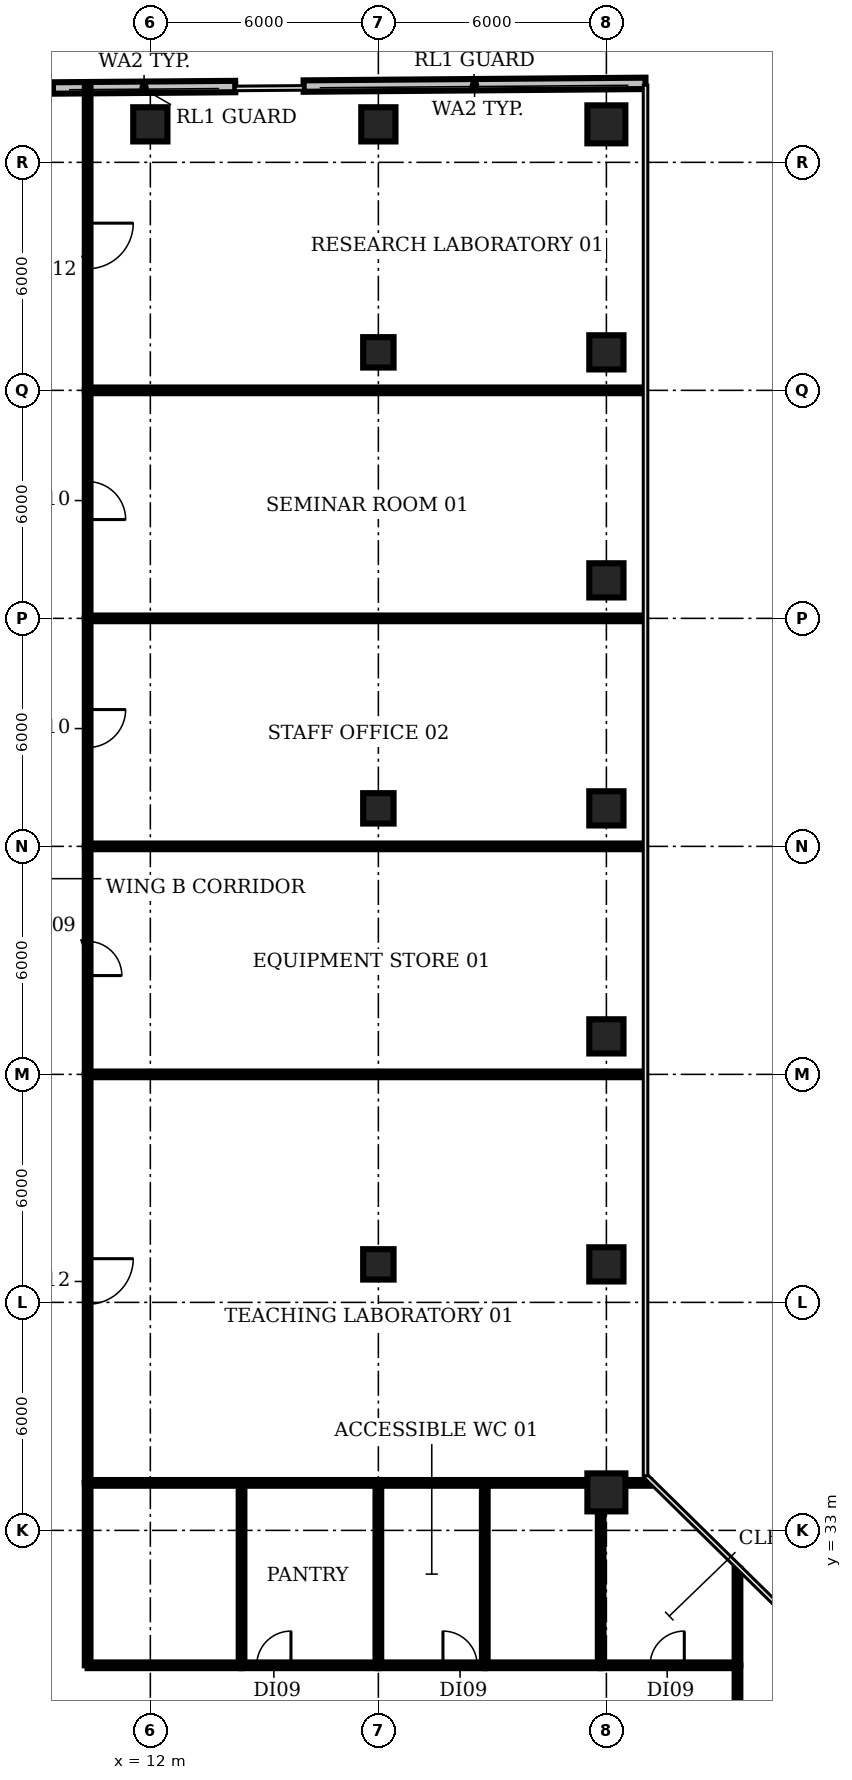
"""IFC4 building model, lengths in metres.
Left out: names, types, materials, properties, quantities, classifications, styles, units other than length and angle.
Written with IfcOpenShell. Run it as: python <this file> out.ifc"""

import sys

from ifc_helpers import new_model, si_unit, direction, frame, frame_2d, origin, origin_2d, place, context, subcontext, project, spatial, rectangle, circle, extrude, element, fill, save


model = new_model("IFC4")
c1 = context("Model", 3, precision=1e-05, world=origin(), true_north=direction((0.0, 1.0)))
c2 = subcontext(c1, "Body", "Model", "MODEL_VIEW")
j1 = project(units=[si_unit("LENGTHUNIT", "METRE"), si_unit("PLANEANGLEUNIT", "RADIAN")], contexts=[c1])
p1 = place(None, origin())
s1 = spatial("IfcSite", under=j1, at=p1, CompositionType="ELEMENT")
p2 = place(p1, origin())
s2 = spatial("IfcBuilding", under=s1, at=p2, CompositionType="ELEMENT")
p3 = place(p2, frame((0.0, 0.0, 108.8)))
s3 = spatial("IfcBuildingStorey", under=s2, at=p3, CompositionType="ELEMENT", Elevation=108.8)
p4 = place(p3, frame((12.0, 70.0, 0.0), z_axis=(0.0, 0.0, 1.0), x_axis=(1.0, 0.0, 0.0)))
e1 = element("IfcColumn", 1, at=p4, inside=s3, PredefinedType="COLUMN", context=c2, shape_type="SweptSolid", body=[
    extrude(rectangle(XDim=0.9, YDim=0.9, at=origin_2d()), origin(), (0.0, 0.0, 1.0), 3.85),
])
for number, where, z_axis, x_axis in (
    (2, (18.0, 40.0, 0.0), (0.0, 0.0, 1.0), (1.0, 0.0, 0.0)),
    (3, (18.0, 52.0, 0.0), (0.0, 0.0, 1.0), (1.0, 0.0, 0.0)),
    (4, (18.0, 64.0, 0.0), (0.0, 0.0, 1.0), (1.0, 0.0, 0.0)),
):
    element("IfcColumn", number, at=place(p3, frame(where, z_axis=z_axis, x_axis=x_axis)), inside=s3, PredefinedType="COLUMN", context=c2, shape_type="SweptSolid", body=[
        extrude(rectangle(XDim=0.8, YDim=0.8, at=origin_2d()), origin(), (0.0, 0.0, 1.0), 3.85),
    ])
p5 = place(p3, frame((18.0, 70.0, 0.0), z_axis=(0.0, 0.0, 1.0), x_axis=(1.0, 0.0, 0.0)))
e5 = element("IfcColumn", 5, at=p5, inside=s3, PredefinedType="COLUMN", context=c2, shape_type="SweptSolid", body=[
    extrude(rectangle(XDim=0.9, YDim=0.9, at=origin_2d()), origin(), (0.0, 0.0, 1.0), 3.85),
])
p6 = place(p3, frame((24.0, 34.0, 0.0), z_axis=(0.0, 0.0, 1.0), x_axis=(1.0, 0.0, 0.0)))
e6 = element("IfcColumn", 6, at=p6, inside=s3, PredefinedType="COLUMN", context=c2, shape_type="SweptSolid", body=[
    extrude(circle(Radius=0.5, at=origin_2d()), origin(), (0.0, 0.0, 1.0), 3.85),
])
for number, where, z_axis, x_axis in (
    (7, (24.0, 40.0, 0.0), (0.0, 0.0, 1.0), (1.0, 0.0, 0.0)),
    (8, (24.0, 46.0, 0.0), (0.0, 0.0, 1.0), (1.0, 0.0, 0.0)),
    (9, (24.0, 52.0, 0.0), (0.0, 0.0, 1.0), (1.0, 0.0, 0.0)),
    (10, (24.0, 58.0, 0.0), (0.0, 0.0, 1.0), (1.0, 0.0, 0.0)),
    (11, (24.0, 64.0, 0.0), (0.0, 0.0, 1.0), (1.0, 0.0, 0.0)),
):
    element("IfcColumn", number, at=place(p3, frame(where, z_axis=z_axis, x_axis=x_axis)), inside=s3, PredefinedType="COLUMN", context=c2, shape_type="SweptSolid", body=[
        extrude(rectangle(XDim=0.9, YDim=0.9, at=origin_2d()), origin(), (0.0, 0.0, 1.0), 3.85),
    ])
p7 = place(p3, frame((24.0, 70.0, 0.0), z_axis=(0.0, 0.0, 1.0), x_axis=(1.0, 0.0, 0.0)))
e12 = element("IfcColumn", 12, at=p7, inside=s3, PredefinedType="COLUMN", context=c2, shape_type="SweptSolid", body=[
    extrude(circle(Radius=0.5, at=origin_2d()), origin(), (0.0, 0.0, 1.0), 3.85),
])
p8 = place(p3, frame((25.03, 71.078, 0.0), z_axis=(0.0, 0.0, 1.0), x_axis=(-0.999968601349, -0.007924412614, 0.0)))
e13 = element("IfcWall", 13, at=p8, inside=s3, PredefinedType="SOLIDWALL", context=c2, shape_type="SweptSolid", body=[
    extrude(rectangle(XDim=8.996, YDim=0.3, at=frame_2d((4.498, 0.0))), origin(), (0.0, 0.0, 1.0), 3.85),
])
p9 = place(p3, frame((14.234, 70.995, 0.0), z_axis=(0.0, 0.0, 1.0), x_axis=(-0.999968890859, -0.007887795322, 0.0)))
e14 = element("IfcWall", 14, at=p9, inside=s3, PredefinedType="SOLIDWALL", context=c2, shape_type="SweptSolid", body=[
    extrude(rectangle(XDim=4.798, YDim=0.3, at=frame_2d((2.399, 0.0))), origin(), (0.0, 0.0, 1.0), 3.85),
])
p10 = place(p3, frame((10.35, 29.45, 0.0), z_axis=(0.0, 0.0, 1.0), x_axis=(0.0, 1.0, 0.0)))
e15 = element("IfcWall", 15, at=p10, inside=s3, PredefinedType="PARTITIONING", context=c2, shape_type="SweptSolid", body=[
    extrude(rectangle(XDim=4.8, YDim=0.15, at=frame_2d((2.4, 0.0))), origin(), (0.0, 0.0, 1.0), 2.83),
])
p11 = place(p3, frame((10.35, 29.45, 0.0), z_axis=(0.0, 0.0, 1.0), x_axis=(1.0, 0.0, 0.0)))
e16 = element("IfcWall", 16, at=p11, inside=s3, PredefinedType="PARTITIONING", context=c2, shape_type="SweptSolid", body=[
    extrude(rectangle(XDim=4.05, YDim=0.15, at=frame_2d((2.025, 0.0))), origin(), (0.0, 0.0, 1.0), 2.83),
])
p12 = place(p3, frame((10.35, 34.25, 0.0), z_axis=(0.0, 0.0, 1.0), x_axis=(1.0, 0.0, 0.0)))
e17 = element("IfcWall", 17, at=p12, inside=s3, PredefinedType="PARTITIONING", context=c2, shape_type="SweptSolid", body=[
    extrude(rectangle(XDim=14.8, YDim=0.15, at=frame_2d((7.4, 0.0))), origin(), (0.0, 0.0, 1.0), 2.83),
])
p13 = place(p3, frame((10.35, 45.0, 0.0), z_axis=(0.0, 0.0, 1.0), x_axis=(0.0, -1.0, 0.0)))
e18 = element("IfcWall", 18, at=p13, inside=s3, PredefinedType="PARTITIONING", context=c2, shape_type="SweptSolid", body=[
    extrude(rectangle(XDim=10.75, YDim=0.15, at=frame_2d((5.375, 0.0))), origin(), (0.0, 0.0, 1.0), 2.83),
])
p14 = place(p13, frame((4.85, 0.0, 0.0)))
e19 = element("IfcOpeningElement", 19, at=p14, cuts=e18, PredefinedType="OPENING", context=c2, shape_type="SweptSolid", body=[
    extrude(rectangle(XDim=1.2, YDim=2.1, at=frame_2d((0.6, 1.05))), frame((0.0, 0.085, 0.0), z_axis=(0.0, -1.0, 0.0), x_axis=(1.0, 0.0, 0.0)), (0.0, 0.0, 1.0), 0.17),
])
p15 = place(p3, frame((10.35, 45.0, 0.0), z_axis=(0.0, 0.0, 1.0), x_axis=(1.0, 0.0, 0.0)))
e20 = element("IfcWall", 20, at=p15, inside=s3, PredefinedType="PARTITIONING", context=c2, shape_type="SweptSolid", body=[
    extrude(rectangle(XDim=14.63, YDim=0.15, at=frame_2d((7.315, 0.0))), origin(), (0.0, 0.0, 1.0), 2.83),
])
p16 = place(p3, frame((10.35, 51.0, 0.0), z_axis=(0.0, 0.0, 1.0), x_axis=(0.0, -1.0, 0.0)))
e21 = element("IfcWall", 21, at=p16, inside=s3, PredefinedType="PARTITIONING", context=c2, shape_type="SweptSolid", body=[
    extrude(rectangle(XDim=6.0, YDim=0.15, at=frame_2d((3.0, 0.0))), origin(), (0.0, 0.0, 1.0), 2.83),
])
p17 = place(p16, frame((2.5, 0.0, 0.0)))
e22 = element("IfcOpeningElement", 22, at=p17, cuts=e21, PredefinedType="OPENING", context=c2, shape_type="SweptSolid", body=[
    extrude(rectangle(XDim=0.9, YDim=2.1, at=frame_2d((0.45, 1.05))), frame((0.0, 0.085, 0.0), z_axis=(0.0, -1.0, 0.0), x_axis=(1.0, 0.0, 0.0)), (0.0, 0.0, 1.0), 0.17),
])
p18 = place(p3, frame((10.35, 51.0, 0.0), z_axis=(0.0, 0.0, 1.0), x_axis=(1.0, 0.0, 0.0)))
e23 = element("IfcWall", 23, at=p18, inside=s3, PredefinedType="PARTITIONING", context=c2, shape_type="SweptSolid", body=[
    extrude(rectangle(XDim=14.63, YDim=0.15, at=frame_2d((7.315, 0.0))), origin(), (0.0, 0.0, 1.0), 2.83),
])
p19 = place(p3, frame((10.35, 57.0, 0.0), z_axis=(0.0, 0.0, 1.0), x_axis=(0.0, -1.0, 0.0)))
e24 = element("IfcWall", 24, at=p19, inside=s3, PredefinedType="PARTITIONING", context=c2, shape_type="SweptSolid", body=[
    extrude(rectangle(XDim=6.0, YDim=0.15, at=frame_2d((3.0, 0.0))), origin(), (0.0, 0.0, 1.0), 2.83),
])
p20 = place(p19, frame((2.4, 0.0, 0.0)))
e25 = element("IfcOpeningElement", 25, at=p20, cuts=e24, PredefinedType="OPENING", context=c2, shape_type="SweptSolid", body=[
    extrude(rectangle(XDim=1.0, YDim=2.1, at=frame_2d((0.5, 1.05))), frame((0.0, 0.085, 0.0), z_axis=(0.0, -1.0, 0.0), x_axis=(1.0, 0.0, 0.0)), (0.0, 0.0, 1.0), 0.17),
])
p21 = place(p3, frame((10.35, 57.0, 0.0), z_axis=(0.0, 0.0, 1.0), x_axis=(1.0, 0.0, 0.0)))
e26 = element("IfcWall", 26, at=p21, inside=s3, PredefinedType="PARTITIONING", context=c2, shape_type="SweptSolid", body=[
    extrude(rectangle(XDim=14.63, YDim=0.15, at=frame_2d((7.315, 0.0))), origin(), (0.0, 0.0, 1.0), 2.83),
])
p22 = place(p3, frame((10.35, 63.0, 0.0), z_axis=(0.0, 0.0, 1.0), x_axis=(0.0, -1.0, 0.0)))
e27 = element("IfcWall", 27, at=p22, inside=s3, PredefinedType="PARTITIONING", context=c2, shape_type="SweptSolid", body=[
    extrude(rectangle(XDim=6.0, YDim=0.15, at=frame_2d((3.0, 0.0))), origin(), (0.0, 0.0, 1.0), 2.83),
])
p23 = place(p22, frame((2.4, 0.0, 0.0)))
e28 = element("IfcOpeningElement", 28, at=p23, cuts=e27, PredefinedType="OPENING", context=c2, shape_type="SweptSolid", body=[
    extrude(rectangle(XDim=1.0, YDim=2.1, at=frame_2d((0.5, 1.05))), frame((0.0, 0.085, 0.0), z_axis=(0.0, -1.0, 0.0), x_axis=(1.0, 0.0, 0.0)), (0.0, 0.0, 1.0), 0.17),
])
p24 = place(p3, frame((10.35, 63.0, 0.0), z_axis=(0.0, 0.0, 1.0), x_axis=(1.0, 0.0, 0.0)))
e29 = element("IfcWall", 29, at=p24, inside=s3, PredefinedType="PARTITIONING", context=c2, shape_type="SweptSolid", body=[
    extrude(rectangle(XDim=14.63, YDim=0.15, at=frame_2d((7.315, 0.0))), origin(), (0.0, 0.0, 1.0), 2.83),
])
p25 = place(p3, frame((10.35, 70.974, 0.0), z_axis=(0.0, 0.0, 1.0), x_axis=(0.0, -1.0, 0.0)))
e30 = element("IfcWall", 30, at=p25, inside=s3, PredefinedType="PARTITIONING", context=c2, shape_type="SweptSolid", body=[
    extrude(rectangle(XDim=7.974, YDim=0.15, at=frame_2d((3.987, 0.0))), origin(), (0.0, 0.0, 1.0), 2.83),
])
p26 = place(p25, frame((3.574, 0.0, 0.0)))
e31 = element("IfcOpeningElement", 31, at=p26, cuts=e30, PredefinedType="OPENING", context=c2, shape_type="SweptSolid", body=[
    extrude(rectangle(XDim=1.2, YDim=2.1, at=frame_2d((0.6, 1.05))), frame((0.0, 0.085, 0.0), z_axis=(0.0, -1.0, 0.0), x_axis=(1.0, 0.0, 0.0)), (0.0, 0.0, 1.0), 0.17),
])
p27 = place(p3, frame((14.4, 29.45, 0.0), z_axis=(0.0, 0.0, 1.0), x_axis=(0.0, 1.0, 0.0)))
e32 = element("IfcWall", 32, at=p27, inside=s3, PredefinedType="PARTITIONING", context=c2, shape_type="SweptSolid", body=[
    extrude(rectangle(XDim=4.8, YDim=0.15, at=frame_2d((2.4, 0.0))), origin(), (0.0, 0.0, 1.0), 2.83),
])
p28 = place(p3, frame((14.4, 29.45, 0.0), z_axis=(0.0, 0.0, 1.0), x_axis=(1.0, 0.0, 0.0)))
e33 = element("IfcWall", 33, at=p28, inside=s3, PredefinedType="PARTITIONING", context=c2, shape_type="SweptSolid", body=[
    extrude(rectangle(XDim=3.6, YDim=0.15, at=frame_2d((1.8, 0.0))), origin(), (0.0, 0.0, 1.0), 2.83),
])
p29 = place(p28, frame((0.4, 0.0, 0.0)))
e34 = element("IfcOpeningElement", 34, at=p29, cuts=e33, PredefinedType="OPENING", context=c2, shape_type="SweptSolid", body=[
    extrude(rectangle(XDim=0.9, YDim=2.1, at=frame_2d((0.45, 1.05))), frame((0.0, 0.085, 0.0), z_axis=(0.0, -1.0, 0.0), x_axis=(1.0, 0.0, 0.0)), (0.0, 0.0, 1.0), 0.17),
])
p30 = place(p3, frame((18.0, 29.45, 0.0), z_axis=(0.0, 0.0, 1.0), x_axis=(0.0, 1.0, 0.0)))
e35 = element("IfcWall", 35, at=p30, inside=s3, PredefinedType="PARTITIONING", context=c2, shape_type="SweptSolid", body=[
    extrude(rectangle(XDim=4.8, YDim=0.15, at=frame_2d((2.4, 0.0))), origin(), (0.0, 0.0, 1.0), 2.83),
])
p31 = place(p3, frame((18.0, 29.45, 0.0), z_axis=(0.0, 0.0, 1.0), x_axis=(1.0, 0.0, 0.0)))
e36 = element("IfcWall", 36, at=p31, inside=s3, PredefinedType="PARTITIONING", context=c2, shape_type="SweptSolid", body=[
    extrude(rectangle(XDim=2.8, YDim=0.15, at=frame_2d((1.4, 0.0))), origin(), (0.0, 0.0, 1.0), 2.83),
])
p32 = place(p31, frame((1.7, 0.0, 0.0)))
e37 = element("IfcOpeningElement", 37, at=p32, cuts=e36, PredefinedType="OPENING", context=c2, shape_type="SweptSolid", body=[
    extrude(rectangle(XDim=0.9, YDim=2.1, at=frame_2d((0.45, 1.05))), frame((0.0, 0.085, 0.0), z_axis=(0.0, -1.0, 0.0), x_axis=(1.0, 0.0, 0.0)), (0.0, 0.0, 1.0), 0.17),
])
p33 = place(p3, frame((20.8, 29.45, 0.0), z_axis=(0.0, 0.0, 1.0), x_axis=(0.0, 1.0, 0.0)))
e38 = element("IfcWall", 38, at=p33, inside=s3, PredefinedType="PARTITIONING", context=c2, shape_type="SweptSolid", body=[
    extrude(rectangle(XDim=4.8, YDim=0.15, at=frame_2d((2.4, 0.0))), origin(), (0.0, 0.0, 1.0), 2.83),
])
p34 = place(p3, frame((20.8, 29.45, 0.0), z_axis=(0.0, 0.0, 1.0), x_axis=(1.0, 0.0, 0.0)))
e39 = element("IfcWall", 39, at=p34, inside=s3, PredefinedType="PARTITIONING", context=c2, shape_type="SweptSolid", body=[
    extrude(rectangle(XDim=3.05, YDim=0.15, at=frame_2d((1.525, 0.0))), origin(), (0.0, 0.0, 1.0), 2.83),
])
p35 = place(p3, frame((23.85, 29.45, 0.0), z_axis=(0.0, 0.0, 1.0), x_axis=(0.0, 1.0, 0.0)))
e40 = element("IfcWall", 40, at=p35, inside=s3, PredefinedType="PARTITIONING", context=c2, shape_type="SweptSolid", body=[
    extrude(rectangle(XDim=4.8, YDim=0.15, at=frame_2d((2.4, 0.0))), origin(), (0.0, 0.0, 1.0), 2.83),
])
p36 = place(p3, frame((23.85, 29.45, 0.0), z_axis=(0.0, 0.0, 1.0), x_axis=(1.0, 0.0, 0.0)))
e41 = element("IfcWall", 41, at=p36, inside=s3, PredefinedType="PARTITIONING", context=c2, shape_type="SweptSolid", body=[
    extrude(rectangle(XDim=3.6, YDim=0.15, at=frame_2d((1.8, 0.0))), origin(), (0.0, 0.0, 1.0), 2.83),
])
p37 = place(p36, frame((1.3, 0.0, 0.0)))
e42 = element("IfcOpeningElement", 42, at=p37, cuts=e41, PredefinedType="OPENING", context=c2, shape_type="SweptSolid", body=[
    extrude(rectangle(XDim=0.9, YDim=2.1, at=frame_2d((0.45, 1.05))), frame((0.0, 0.085, 0.0), z_axis=(0.0, -1.0, 0.0), x_axis=(1.0, 0.0, 0.0)), (0.0, 0.0, 1.0), 0.17),
])
p38 = place(p3, frame((27.45, 25.6, 0.0), z_axis=(0.0, 0.0, 1.0), x_axis=(0.0, 1.0, 0.0)))
e43 = element("IfcWall", 43, at=p38, inside=s3, PredefinedType="PARTITIONING", context=c2, shape_type="SweptSolid", body=[
    extrude(rectangle(XDim=3.85, YDim=0.15, at=frame_2d((1.925, 0.0))), origin(), (0.0, 0.0, 1.0), 2.83),
])
p39 = place(p3, frame((27.45, 29.45, 0.0), z_axis=(0.0, 0.0, 1.0), x_axis=(0.0, 1.0, 0.0)))
e44 = element("IfcWall", 44, at=p39, inside=s3, PredefinedType="PARTITIONING", context=c2, shape_type="SweptSolid", body=[
    extrude(rectangle(XDim=2.54, YDim=0.15, at=frame_2d((1.27, 0.0))), origin(), (0.0, 0.0, 1.0), 2.83),
])
p40 = place(p14, origin())
e45 = element("IfcDoor", 45, at=p40, inside=s3, OperationType="SINGLE_SWING_LEFT", PredefinedType="DOOR", context=c2, shape_type="SweptSolid", body=[
    extrude(rectangle(XDim=1.2, YDim=2.1, at=frame_2d((0.6, 1.05))), frame((0.0, 0.025, 0.0), z_axis=(0.0, -1.0, 0.0), x_axis=(1.0, 0.0, 0.0)), (0.0, 0.0, 1.0), 0.05),
])
fill(e19, e45)
p41 = place(p17, origin())
e46 = element("IfcDoor", 46, at=p41, inside=s3, OperationType="SINGLE_SWING_RIGHT", PredefinedType="DOOR", context=c2, shape_type="SweptSolid", body=[
    extrude(rectangle(XDim=0.9, YDim=2.1, at=frame_2d((0.45, 1.05))), frame((0.0, 0.025, 0.0), z_axis=(0.0, -1.0, 0.0), x_axis=(1.0, 0.0, 0.0)), (0.0, 0.0, 1.0), 0.05),
])
fill(e22, e46)
p42 = place(p20, origin())
e47 = element("IfcDoor", 47, at=p42, inside=s3, OperationType="SINGLE_SWING_LEFT", PredefinedType="DOOR", context=c2, shape_type="SweptSolid", body=[
    extrude(rectangle(XDim=1.0, YDim=2.1, at=frame_2d((0.5, 1.05))), frame((0.0, 0.025, 0.0), z_axis=(0.0, -1.0, 0.0), x_axis=(1.0, 0.0, 0.0)), (0.0, 0.0, 1.0), 0.05),
])
fill(e25, e47)
p43 = place(p23, origin())
e48 = element("IfcDoor", 48, at=p43, inside=s3, OperationType="SINGLE_SWING_RIGHT", PredefinedType="DOOR", context=c2, shape_type="SweptSolid", body=[
    extrude(rectangle(XDim=1.0, YDim=2.1, at=frame_2d((0.5, 1.05))), frame((0.0, 0.025, 0.0), z_axis=(0.0, -1.0, 0.0), x_axis=(1.0, 0.0, 0.0)), (0.0, 0.0, 1.0), 0.05),
])
fill(e28, e48)
p44 = place(p26, origin())
e49 = element("IfcDoor", 49, at=p44, inside=s3, OperationType="SINGLE_SWING_LEFT", PredefinedType="DOOR", context=c2, shape_type="SweptSolid", body=[
    extrude(rectangle(XDim=1.2, YDim=2.1, at=frame_2d((0.6, 1.05))), frame((0.0, 0.025, 0.0), z_axis=(0.0, -1.0, 0.0), x_axis=(1.0, 0.0, 0.0)), (0.0, 0.0, 1.0), 0.05),
])
fill(e31, e49)
p45 = place(p29, origin())
e50 = element("IfcDoor", 50, at=p45, inside=s3, OperationType="SINGLE_SWING_RIGHT", PredefinedType="DOOR", context=c2, shape_type="SweptSolid", body=[
    extrude(rectangle(XDim=0.9, YDim=2.1, at=frame_2d((0.45, 1.05))), frame((0.0, 0.025, 0.0), z_axis=(0.0, -1.0, 0.0), x_axis=(1.0, 0.0, 0.0)), (0.0, 0.0, 1.0), 0.05),
])
fill(e34, e50)
p46 = place(p32, origin())
e51 = element("IfcDoor", 51, at=p46, inside=s3, OperationType="SINGLE_SWING_LEFT", PredefinedType="DOOR", context=c2, shape_type="SweptSolid", body=[
    extrude(rectangle(XDim=0.9, YDim=2.1, at=frame_2d((0.45, 1.05))), frame((0.0, 0.025, 0.0), z_axis=(0.0, -1.0, 0.0), x_axis=(1.0, 0.0, 0.0)), (0.0, 0.0, 1.0), 0.05),
])
fill(e37, e51)
p47 = place(p37, origin())
e52 = element("IfcDoor", 52, at=p47, inside=s3, OperationType="SINGLE_SWING_RIGHT", PredefinedType="DOOR", context=c2, shape_type="SweptSolid", body=[
    extrude(rectangle(XDim=0.9, YDim=2.1, at=frame_2d((0.45, 1.05))), frame((0.0, 0.025, 0.0), z_axis=(0.0, -1.0, 0.0), x_axis=(1.0, 0.0, 0.0)), (0.0, 0.0, 1.0), 0.05),
])
fill(e42, e52)
save(model, sys.argv[1])
